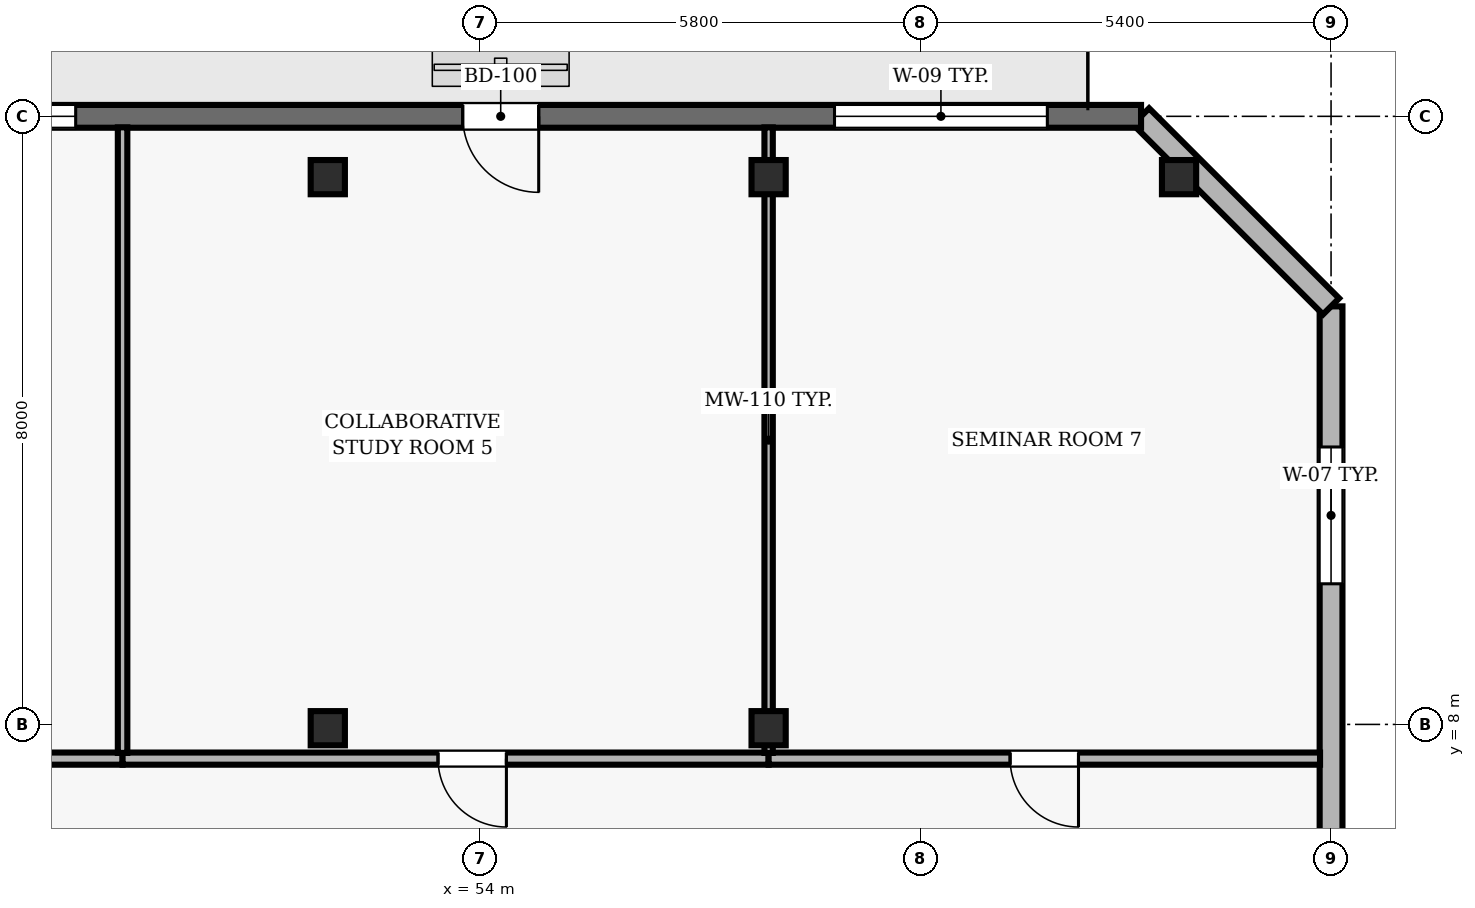
"""IFC4 building model, lengths in metres.
Left out: names, types, materials, properties, quantities, classifications, styles, units other than length and angle.
Written with IfcOpenShell. Run it as: python <this file> out.ifc"""

import sys

from ifc_helpers import new_model, si_unit, direction, frame, frame_2d, origin, origin_2d, place, context, subcontext, project, spatial, rectangle, hollow_rectangle, extrude, element, fill, save


model = new_model("IFC4")
c1 = context("Model", 3, precision=1e-05, world=origin(), true_north=direction((0.0, 1.0)))
c2 = subcontext(c1, "Body", "Model", "MODEL_VIEW")
j1 = project(units=[si_unit("LENGTHUNIT", "METRE"), si_unit("PLANEANGLEUNIT", "RADIAN")], contexts=[c1])
p1 = place(None, origin())
s1 = spatial("IfcSite", under=j1, at=p1, CompositionType="ELEMENT")
p2 = place(p1, origin())
s2 = spatial("IfcBuilding", under=s1, at=p2, CompositionType="ELEMENT")
p3 = place(p2, frame((0.0, 0.0, 214.8)))
s3 = spatial("IfcBuildingStorey", under=s2, at=p3, CompositionType="ELEMENT", Elevation=214.8)
for number, where, z_axis, x_axis in (
    (1, (52.0, 7.95, 0.0), (0.0, 0.0, 1.0), (1.0, 0.0, 0.0)),
    (2, (52.0, 15.2, 0.0), (0.0, 0.0, 1.0), (1.0, 0.0, 0.0)),
    (3, (57.8, 7.95, 0.0), (0.0, 0.0, 1.0), (1.0, 0.0, 0.0)),
    (4, (57.8, 15.2, 0.0), (0.0, 0.0, 1.0), (1.0, 0.0, 0.0)),
    (5, (63.2, 15.2, 0.0), (0.0, 0.0, 1.0), (1.0, 0.0, 0.0)),
):
    element("IfcColumn", number, at=place(p3, frame(where, z_axis=z_axis, x_axis=x_axis)), inside=s3, PredefinedType="COLUMN", context=c2, shape_type="SweptSolid", body=[
        extrude(hollow_rectangle(XDim=0.45, YDim=0.45, WallThickness=0.02, at=origin_2d()), origin(), (0.0, 0.0, 1.0), 3.9),
    ])
p4 = place(p3, frame((65.2, 2.5, 0.0), z_axis=(0.0, 0.0, 1.0), x_axis=(0.0, 1.0, 0.0)))
e6 = element("IfcWall", 6, at=p4, inside=s3, PredefinedType="SOLIDWALL", context=c2, shape_type="SweptSolid", body=[
    extrude(rectangle(XDim=11.0, YDim=0.3, at=frame_2d((5.5, 0.0))), origin(), (0.0, 0.0, 1.0), 3.69),
])
p5 = place(p4, frame((7.35, 0.0, 0.9)))
e7 = element("IfcOpeningElement", 7, at=p5, cuts=e6, PredefinedType="OPENING", context=c2, shape_type="SweptSolid", body=[
    extrude(rectangle(XDim=1.8, YDim=1.8, at=frame_2d((0.9, 0.9))), frame((0.0, 0.16, 0.0), z_axis=(0.0, -1.0, 0.0), x_axis=(1.0, 0.0, 0.0)), (0.0, 0.0, 1.0), 0.32),
])
p6 = place(p3, frame((65.2, 13.5, 0.0), z_axis=(0.0, 0.0, 1.0), x_axis=(-0.707106781187, 0.707106781187, 0.0)))
e8 = element("IfcWall", 8, at=p6, inside=s3, PredefinedType="SOLIDWALL", context=c2, shape_type="SweptSolid", body=[
    extrude(rectangle(XDim=3.536, YDim=0.3, at=frame_2d((1.768, 0.0))), origin(), (0.0, 0.0, 1.0), 3.69),
])
p7 = place(p3, frame((62.7, 16.0, 0.0), z_axis=(0.0, 0.0, 1.0), x_axis=(-1.0, 0.0, 0.0)))
e9 = element("IfcWall", 9, at=p7, inside=s3, PredefinedType="SOLIDWALL", context=c2, shape_type="SweptSolid", body=[
    extrude(rectangle(XDim=18.5, YDim=0.3, at=frame_2d((9.25, 0.0))), origin(), (0.0, 0.0, 1.0), 3.69),
])
p8 = place(p7, frame((7.925, 0.0, 0.0)))
e10 = element("IfcOpeningElement", 10, at=p8, cuts=e9, PredefinedType="OPENING", context=c2, shape_type="SweptSolid", body=[
    extrude(rectangle(XDim=1.0, YDim=2.2, at=frame_2d((0.5, 1.1))), frame((0.0, 0.16, 0.0), z_axis=(0.0, -1.0, 0.0), x_axis=(1.0, 0.0, 0.0)), (0.0, 0.0, 1.0), 0.32),
])
p9 = place(p7, frame((1.233, 0.0, 0.9)))
e11 = element("IfcOpeningElement", 11, at=p9, cuts=e9, PredefinedType="OPENING", context=c2, shape_type="SweptSolid", body=[
    extrude(rectangle(XDim=2.8, YDim=1.8, at=frame_2d((1.4, 0.9))), frame((0.0, 0.16, 0.0), z_axis=(0.0, -1.0, 0.0), x_axis=(1.0, 0.0, 0.0)), (0.0, 0.0, 1.0), 0.32),
])
p10 = place(p7, frame((14.017, 0.0, 0.9)))
e12 = element("IfcOpeningElement", 12, at=p10, cuts=e9, PredefinedType="OPENING", context=c2, shape_type="SweptSolid", body=[
    extrude(rectangle(XDim=2.8, YDim=1.8, at=frame_2d((1.4, 0.9))), frame((0.0, 0.16, 0.0), z_axis=(0.0, -1.0, 0.0), x_axis=(1.0, 0.0, 0.0)), (0.0, 0.0, 1.0), 0.32),
])
p11 = place(p3, frame((49.3, 7.55, 0.0), z_axis=(0.0, 0.0, 1.0), x_axis=(-1.0, 0.0, 0.0)))
e13 = element("IfcWall", 13, at=p11, inside=s3, PredefinedType="PARTITIONING", context=c2, shape_type="SweptSolid", body=[
    extrude(rectangle(XDim=8.95, YDim=0.16, at=frame_2d((4.475, 0.0))), origin(), (0.0, 0.0, 1.0), 3.139),
])
p12 = place(p11, frame((5.075, 0.0, 0.0)))
e14 = element("IfcOpeningElement", 14, at=p12, cuts=e13, PredefinedType="OPENING", context=c2, shape_type="SweptSolid", body=[
    extrude(rectangle(XDim=0.9, YDim=2.1, at=frame_2d((0.45, 1.05))), frame((0.0, 0.09, 0.0), z_axis=(0.0, -1.0, 0.0), x_axis=(1.0, 0.0, 0.0)), (0.0, 0.0, 1.0), 0.18),
])
p13 = place(p3, frame((57.8, 7.55, 0.0), z_axis=(0.0, 0.0, 1.0), x_axis=(-1.0, 0.0, 0.0)))
e15 = element("IfcWall", 15, at=p13, inside=s3, PredefinedType="PARTITIONING", context=c2, shape_type="SweptSolid", body=[
    extrude(rectangle(XDim=8.5, YDim=0.16, at=frame_2d((4.25, 0.0))), origin(), (0.0, 0.0, 1.0), 3.139),
])
p14 = place(p13, frame((3.45, 0.0, 0.0)))
e16 = element("IfcOpeningElement", 16, at=p14, cuts=e15, PredefinedType="OPENING", context=c2, shape_type="SweptSolid", body=[
    extrude(rectangle(XDim=0.9, YDim=2.1, at=frame_2d((0.45, 1.05))), frame((0.0, 0.09, 0.0), z_axis=(0.0, -1.0, 0.0), x_axis=(1.0, 0.0, 0.0)), (0.0, 0.0, 1.0), 0.18),
])
p15 = place(p3, frame((65.055, 7.55, 0.0), z_axis=(0.0, 0.0, 1.0), x_axis=(-1.0, 0.0, 0.0)))
e17 = element("IfcWall", 17, at=p15, inside=s3, PredefinedType="PARTITIONING", context=c2, shape_type="SweptSolid", body=[
    extrude(rectangle(XDim=7.255, YDim=0.16, at=frame_2d((3.627, 0.0))), origin(), (0.0, 0.0, 1.0), 3.69),
])
p16 = place(p15, frame((3.178, 0.0, 0.0)))
e18 = element("IfcOpeningElement", 18, at=p16, cuts=e17, PredefinedType="OPENING", context=c2, shape_type="SweptSolid", body=[
    extrude(rectangle(XDim=0.9, YDim=2.1, at=frame_2d((0.45, 1.05))), frame((0.0, 0.09, 0.0), z_axis=(0.0, -1.0, 0.0), x_axis=(1.0, 0.0, 0.0)), (0.0, 0.0, 1.0), 0.18),
])
p17 = place(p3, frame((49.3, 7.625, 0.0), z_axis=(0.0, 0.0, 1.0), x_axis=(0.0, 1.0, 0.0)))
e19 = element("IfcWall", 19, at=p17, inside=s3, PredefinedType="PARTITIONING", context=c2, shape_type="SweptSolid", body=[
    extrude(rectangle(XDim=8.23, YDim=0.125, at=frame_2d((4.115, 0.0))), origin(), (0.0, 0.0, 1.0), 3.69),
])
p18 = place(p3, frame((57.8, 7.625, 0.0), z_axis=(0.0, 0.0, 1.0), x_axis=(0.0, 1.0, 0.0)))
e20 = element("IfcWall", 20, at=p18, inside=s3, PredefinedType="MOVABLE", context=c2, shape_type="SweptSolid", body=[
    extrude(rectangle(XDim=8.23, YDim=0.11, at=frame_2d((4.115, 0.0))), origin(), (0.0, 0.0, 1.0), 3.139),
])
p19 = place(p5, origin())
e21 = element("IfcWindow", 21, at=p19, inside=s3, PartitioningType="SINGLE_PANEL", PredefinedType="WINDOW", context=c2, shape_type="SweptSolid", body=[
    extrude(rectangle(XDim=1.8, YDim=1.8, at=frame_2d((0.9, 0.9))), frame((0.0, 0.03, 0.0), z_axis=(0.0, -1.0, 0.0), x_axis=(1.0, 0.0, 0.0)), (0.0, 0.0, 1.0), 0.06),
])
fill(e7, e21)
p20 = place(p8, origin())
e22 = element("IfcDoor", 22, at=p20, inside=s3, OperationType="SINGLE_SWING_LEFT", PredefinedType="DOOR", context=c2, shape_type="SweptSolid", body=[
    extrude(rectangle(XDim=1.0, YDim=2.2, at=frame_2d((0.5, 1.1))), frame((0.0, 0.025, 0.0), z_axis=(0.0, -1.0, 0.0), x_axis=(1.0, 0.0, 0.0)), (0.0, 0.0, 1.0), 0.05),
])
fill(e10, e22)
p21 = place(p9, origin())
e23 = element("IfcWindow", 23, at=p21, inside=s3, PartitioningType="SINGLE_PANEL", PredefinedType="WINDOW", context=c2, shape_type="SweptSolid", body=[
    extrude(rectangle(XDim=2.8, YDim=1.8, at=frame_2d((1.4, 0.9))), frame((0.0, 0.03, 0.0), z_axis=(0.0, -1.0, 0.0), x_axis=(1.0, 0.0, 0.0)), (0.0, 0.0, 1.0), 0.06),
])
fill(e11, e23)
p22 = place(p10, origin())
e24 = element("IfcWindow", 24, at=p22, inside=s3, PartitioningType="SINGLE_PANEL", PredefinedType="WINDOW", context=c2, shape_type="SweptSolid", body=[
    extrude(rectangle(XDim=2.8, YDim=1.8, at=frame_2d((1.4, 0.9))), frame((0.0, 0.03, 0.0), z_axis=(0.0, -1.0, 0.0), x_axis=(1.0, 0.0, 0.0)), (0.0, 0.0, 1.0), 0.06),
])
fill(e12, e24)
p23 = place(p14, origin())
e25 = element("IfcDoor", 25, at=p23, inside=s3, OperationType="SINGLE_SWING_LEFT", PredefinedType="DOOR", context=c2, shape_type="SweptSolid", body=[
    extrude(rectangle(XDim=0.9, YDim=2.1, at=frame_2d((0.45, 1.05))), frame((0.0, 0.025, 0.0), z_axis=(0.0, -1.0, 0.0), x_axis=(1.0, 0.0, 0.0)), (0.0, 0.0, 1.0), 0.05),
])
fill(e16, e25)
p24 = place(p16, origin())
e26 = element("IfcDoor", 26, at=p24, inside=s3, OperationType="SINGLE_SWING_LEFT", PredefinedType="DOOR", context=c2, shape_type="SweptSolid", body=[
    extrude(rectangle(XDim=0.9, YDim=2.1, at=frame_2d((0.45, 1.05))), frame((0.0, 0.025, 0.0), z_axis=(0.0, -1.0, 0.0), x_axis=(1.0, 0.0, 0.0)), (0.0, 0.0, 1.0), 0.05),
])
fill(e18, e26)
save(model, sys.argv[1])
